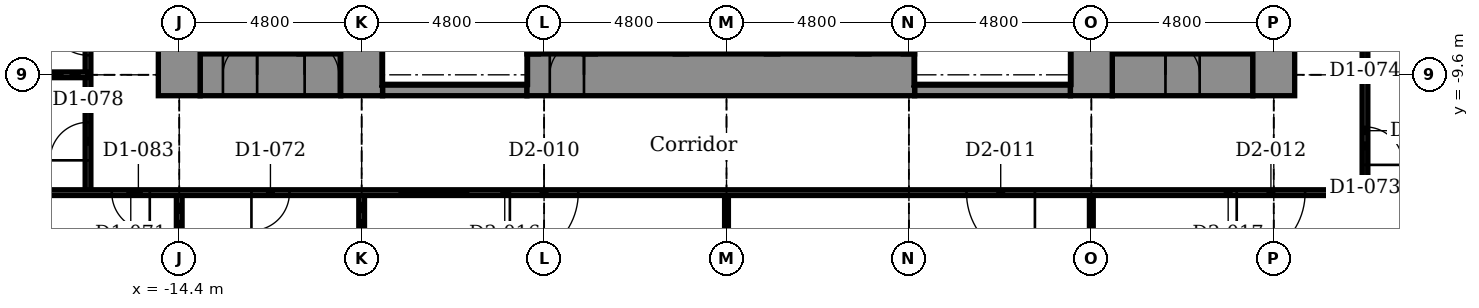
"""IFC4 building model, lengths in metres.
Left out: names, types, materials, properties, quantities, classifications, styles, units other than length and angle.
Written with IfcOpenShell. Run it as: python <this file> out.ifc"""

import sys

from ifc_helpers import new_model, si_unit, direction, frame, frame_2d, origin, place, context, subcontext, project, spatial, rectangle, extrude, element, fill, save


model = new_model("IFC4")
c1 = context("Model", 3, precision=1e-05, world=origin(), true_north=direction((0.0, 1.0)))
c2 = subcontext(c1, "Body", "Model", "MODEL_VIEW")
j1 = project(units=[si_unit("LENGTHUNIT", "METRE"), si_unit("PLANEANGLEUNIT", "RADIAN")], contexts=[c1])
p1 = place(None, origin())
s1 = spatial("IfcSite", under=j1, at=p1, CompositionType="ELEMENT")
p2 = place(p1, origin())
s2 = spatial("IfcBuilding", under=s1, at=p2, CompositionType="ELEMENT")
p3 = place(p2, frame((0.0, 0.0, 22.4)))
s3 = spatial("IfcBuildingStorey", under=s2, at=p3, CompositionType="ELEMENT", Elevation=22.4)
p4 = place(p3, frame((-9.05, -10.0, -0.25), z_axis=(0.0, 0.0, 1.0), x_axis=(1.0, 0.0, 0.0)))
e1 = element("IfcWall", 1, at=p4, inside=s3, PredefinedType="STANDARD", context=c2, shape_type="SweptSolid", body=[
    extrude(rectangle(XDim=3.8, YDim=0.3, at=frame_2d((1.9, 0.0))), origin(), (0.0, 0.0, 1.0), 5.5),
])
p5 = place(p3, frame((4.95, -10.0, -0.25), z_axis=(0.0, 0.0, 1.0), x_axis=(1.0, 0.0, 0.0)))
e2 = element("IfcWall", 2, at=p5, inside=s3, PredefinedType="STANDARD", context=c2, shape_type="SweptSolid", body=[
    extrude(rectangle(XDim=4.1, YDim=0.3, at=frame_2d((2.05, 0.0))), origin(), (0.0, 0.0, 1.0), 5.5),
])
p6 = place(p3, frame((-13.85, -9.6, -0.25), z_axis=(0.0, 0.0, 1.0), x_axis=(1.0, 0.0, 0.0)))
e3 = element("IfcWall", 3, at=p6, inside=s3, PredefinedType="SHEAR", context=c2, shape_type="SweptSolid", body=[
    extrude(rectangle(XDim=3.7, YDim=1.1, at=frame_2d((1.85, 0.0))), origin(), (0.0, 0.0, 1.0), 5.5),
])
p7 = place(p6, frame((0.6, 0.0, 0.25)))
e4 = element("IfcOpeningElement", 4, at=p7, cuts=e3, PredefinedType="OPENING", context=c2, shape_type="SweptSolid", body=[
    extrude(rectangle(XDim=0.9, YDim=2.1, at=frame_2d((0.45, 1.05))), frame((0.0, 0.56, 0.0), z_axis=(0.0, -1.0, 0.0), x_axis=(1.0, 0.0, 0.0)), (0.0, 0.0, 1.0), 1.12),
])
p8 = place(p6, frame((2.75, 0.0, 0.25)))
e5 = element("IfcOpeningElement", 5, at=p8, cuts=e3, PredefinedType="OPENING", context=c2, shape_type="SweptSolid", body=[
    extrude(rectangle(XDim=0.9, YDim=2.1, at=frame_2d((0.45, 1.05))), frame((0.0, 0.56, 0.0), z_axis=(0.0, -1.0, 0.0), x_axis=(1.0, 0.0, 0.0)), (0.0, 0.0, 1.0), 1.12),
])
p9 = place(p3, frame((-5.25, -9.6, -0.25), z_axis=(0.0, 0.0, 1.0), x_axis=(1.0, 0.0, 0.0)))
e6 = element("IfcWall", 6, at=p9, inside=s3, PredefinedType="SHEAR", context=c2, shape_type="SweptSolid", body=[
    extrude(rectangle(XDim=10.2, YDim=1.1, at=frame_2d((5.1, 0.0))), origin(), (0.0, 0.0, 1.0), 5.5),
])
p10 = place(p9, frame((0.6, 0.0, 0.25)))
e7 = element("IfcOpeningElement", 7, at=p10, cuts=e6, PredefinedType="OPENING", context=c2, shape_type="SweptSolid", body=[
    extrude(rectangle(XDim=0.9, YDim=2.1, at=frame_2d((0.45, 1.05))), frame((0.0, 0.56, 0.0), z_axis=(0.0, -1.0, 0.0), x_axis=(1.0, 0.0, 0.0)), (0.0, 0.0, 1.0), 1.12),
])
p11 = place(p3, frame((10.15, -9.6, -0.25), z_axis=(0.0, 0.0, 1.0), x_axis=(1.0, 0.0, 0.0)))
e8 = element("IfcWall", 8, at=p11, inside=s3, PredefinedType="SHEAR", context=c2, shape_type="SweptSolid", body=[
    extrude(rectangle(XDim=3.7, YDim=1.1, at=frame_2d((1.85, 0.0))), origin(), (0.0, 0.0, 1.0), 5.5),
])
p12 = place(p11, frame((1.4, 0.0, 0.25)))
e9 = element("IfcOpeningElement", 9, at=p12, cuts=e8, PredefinedType="OPENING", context=c2, shape_type="SweptSolid", body=[
    extrude(rectangle(XDim=0.9, YDim=2.1, at=frame_2d((0.45, 1.05))), frame((0.0, 0.56, 0.0), z_axis=(0.0, -1.0, 0.0), x_axis=(1.0, 0.0, 0.0)), (0.0, 0.0, 1.0), 1.12),
])
p13 = place(p3, frame((-14.4, -10.15, -0.25), z_axis=(0.0, 0.0, 1.0), x_axis=(0.0, 1.0, 0.0)))
e10 = element("IfcWall", 10, at=p13, inside=s3, PredefinedType="SHEAR", context=c2, shape_type="SweptSolid", body=[
    extrude(rectangle(XDim=20.3, YDim=1.1, at=frame_2d((10.15, 0.0))), origin(), (0.0, 0.0, 1.0), 5.5),
])
p14 = place(p13, frame((3.6, 0.0, 0.25)))
e11 = element("IfcOpeningElement", 11, at=p14, cuts=e10, PredefinedType="OPENING", context=c2, shape_type="SweptSolid", body=[
    extrude(rectangle(XDim=1.1, YDim=2.1, at=frame_2d((0.55, 1.05))), frame((0.0, 0.56, 0.0), z_axis=(0.0, -1.0, 0.0), x_axis=(1.0, 0.0, 0.0)), (0.0, 0.0, 1.0), 1.12),
])
p15 = place(p13, frame((6.0, 0.0, 0.25)))
e12 = element("IfcOpeningElement", 12, at=p15, cuts=e10, PredefinedType="OPENING", context=c2, shape_type="SweptSolid", body=[
    extrude(rectangle(XDim=1.1, YDim=2.1, at=frame_2d((0.55, 1.05))), frame((0.0, 0.56, 0.0), z_axis=(0.0, -1.0, 0.0), x_axis=(1.0, 0.0, 0.0)), (0.0, 0.0, 1.0), 1.12),
])
p16 = place(p13, frame((8.4, 0.0, 0.25)))
e13 = element("IfcOpeningElement", 13, at=p16, cuts=e10, PredefinedType="OPENING", context=c2, shape_type="SweptSolid", body=[
    extrude(rectangle(XDim=1.1, YDim=2.1, at=frame_2d((0.55, 1.05))), frame((0.0, 0.56, 0.0), z_axis=(0.0, -1.0, 0.0), x_axis=(1.0, 0.0, 0.0)), (0.0, 0.0, 1.0), 1.12),
])
p17 = place(p13, frame((10.8, 0.0, 0.25)))
e14 = element("IfcOpeningElement", 14, at=p17, cuts=e10, PredefinedType="OPENING", context=c2, shape_type="SweptSolid", body=[
    extrude(rectangle(XDim=1.1, YDim=2.1, at=frame_2d((0.55, 1.05))), frame((0.0, 0.56, 0.0), z_axis=(0.0, -1.0, 0.0), x_axis=(1.0, 0.0, 0.0)), (0.0, 0.0, 1.0), 1.12),
])
p18 = place(p3, frame((-9.6, -10.15, -0.25), z_axis=(0.0, 0.0, 1.0), x_axis=(0.0, 1.0, 0.0)))
e15 = element("IfcWall", 15, at=p18, inside=s3, PredefinedType="SHEAR", context=c2, shape_type="SweptSolid", body=[
    extrude(rectangle(XDim=7.6, YDim=1.1, at=frame_2d((3.8, 0.0))), origin(), (0.0, 0.0, 1.0), 5.5),
])
p19 = place(p3, frame((-5.1, -9.05, -0.25), z_axis=(0.0, 0.0, 1.0), x_axis=(0.0, 1.0, 0.0)))
e16 = element("IfcWall", 16, at=p19, inside=s3, PredefinedType="STANDARD", context=c2, shape_type="SweptSolid", body=[
    extrude(rectangle(XDim=6.8, YDim=0.3, at=frame_2d((3.4, 0.0))), origin(), (0.0, 0.0, 1.0), 5.5),
])
p20 = place(p19, frame((3.6, 0.0, 0.25)))
e17 = element("IfcOpeningElement", 17, at=p20, cuts=e16, PredefinedType="OPENING", context=c2, shape_type="SweptSolid", body=[
    extrude(rectangle(XDim=1.2, YDim=2.1, at=frame_2d((0.6, 1.05))), frame((0.0, 0.16, 0.0), z_axis=(0.0, -1.0, 0.0), x_axis=(1.0, 0.0, 0.0)), (0.0, 0.0, 1.0), 0.32),
])
for number, where, z_axis, x_axis in (
    (18, (-3.6, -9.05, -0.25), (0.0, 0.0, 1.0), (0.0, 1.0, 0.0)),
    (19, (-1.2, -9.05, -0.25), (0.0, 0.0, 1.0), (0.0, 1.0, 0.0)),
    (20, (1.2, -9.05, -0.25), (0.0, 0.0, 1.0), (0.0, 1.0, 0.0)),
    (21, (3.6, -9.05, -0.25), (0.0, 0.0, 1.0), (0.0, 1.0, 0.0)),
):
    element("IfcWall", number, at=place(p3, frame(where, z_axis=z_axis, x_axis=x_axis)), inside=s3, PredefinedType="STANDARD", context=c2, shape_type="SweptSolid", body=[
        extrude(rectangle(XDim=3.2, YDim=0.3, at=frame_2d((1.6, 0.0))), origin(), (0.0, 0.0, 1.0), 5.5),
    ])
p21 = place(p3, frame((4.8, -9.05, -0.25), z_axis=(0.0, 0.0, 1.0), x_axis=(0.0, 1.0, 0.0)))
e22 = element("IfcWall", 22, at=p21, inside=s3, PredefinedType="STANDARD", context=c2, shape_type="SweptSolid", body=[
    extrude(rectangle(XDim=6.8, YDim=0.3, at=frame_2d((3.4, 0.0))), origin(), (0.0, 0.0, 1.0), 5.5),
])
p22 = place(p21, frame((3.6, 0.0, 0.25)))
e23 = element("IfcOpeningElement", 23, at=p22, cuts=e22, PredefinedType="OPENING", context=c2, shape_type="SweptSolid", body=[
    extrude(rectangle(XDim=1.2, YDim=2.1, at=frame_2d((0.6, 1.05))), frame((0.0, 0.16, 0.0), z_axis=(0.0, -1.0, 0.0), x_axis=(1.0, 0.0, 0.0)), (0.0, 0.0, 1.0), 0.32),
])
p23 = place(p3, frame((9.6, -10.15, -0.25), z_axis=(0.0, 0.0, 1.0), x_axis=(0.0, 1.0, 0.0)))
e24 = element("IfcWall", 24, at=p23, inside=s3, PredefinedType="SHEAR", context=c2, shape_type="SweptSolid", body=[
    extrude(rectangle(XDim=20.3, YDim=1.1, at=frame_2d((10.15, 0.0))), origin(), (0.0, 0.0, 1.0), 5.5),
])
p24 = place(p3, frame((14.4, -10.15, -0.25), z_axis=(0.0, 0.0, 1.0), x_axis=(0.0, 1.0, 0.0)))
e25 = element("IfcWall", 25, at=p24, inside=s3, PredefinedType="SHEAR", context=c2, shape_type="SweptSolid", body=[
    extrude(rectangle(XDim=20.3, YDim=1.1, at=frame_2d((10.15, 0.0))), origin(), (0.0, 0.0, 1.0), 5.5),
])
p25 = place(p24, frame((3.6, 0.0, 0.25)))
e26 = element("IfcOpeningElement", 26, at=p25, cuts=e25, PredefinedType="OPENING", context=c2, shape_type="SweptSolid", body=[
    extrude(rectangle(XDim=1.1, YDim=2.1, at=frame_2d((0.55, 1.05))), frame((0.0, 0.56, 0.0), z_axis=(0.0, -1.0, 0.0), x_axis=(1.0, 0.0, 0.0)), (0.0, 0.0, 1.0), 1.12),
])
p26 = place(p24, frame((6.0, 0.0, 0.25)))
e27 = element("IfcOpeningElement", 27, at=p26, cuts=e25, PredefinedType="OPENING", context=c2, shape_type="SweptSolid", body=[
    extrude(rectangle(XDim=1.1, YDim=2.1, at=frame_2d((0.55, 1.05))), frame((0.0, 0.56, 0.0), z_axis=(0.0, -1.0, 0.0), x_axis=(1.0, 0.0, 0.0)), (0.0, 0.0, 1.0), 1.12),
])
p27 = place(p24, frame((8.4, 0.0, 0.25)))
e28 = element("IfcOpeningElement", 28, at=p27, cuts=e25, PredefinedType="OPENING", context=c2, shape_type="SweptSolid", body=[
    extrude(rectangle(XDim=1.1, YDim=2.1, at=frame_2d((0.55, 1.05))), frame((0.0, 0.56, 0.0), z_axis=(0.0, -1.0, 0.0), x_axis=(1.0, 0.0, 0.0)), (0.0, 0.0, 1.0), 1.12),
])
p28 = place(p24, frame((10.8, 0.0, 0.25)))
e29 = element("IfcOpeningElement", 29, at=p28, cuts=e25, PredefinedType="OPENING", context=c2, shape_type="SweptSolid", body=[
    extrude(rectangle(XDim=1.1, YDim=2.1, at=frame_2d((0.55, 1.05))), frame((0.0, 0.56, 0.0), z_axis=(0.0, -1.0, 0.0), x_axis=(1.0, 0.0, 0.0)), (0.0, 0.0, 1.0), 1.12),
])
p29 = place(p3, frame((16.8, -12.7, 0.0), z_axis=(0.0, 0.0, 1.0), x_axis=(0.0, 1.0, 0.0)))
e30 = element("IfcWall", 30, at=p29, inside=s3, PredefinedType="PARTITIONING", context=c2, shape_type="SweptSolid", body=[
    extrude(rectangle(XDim=8.75, YDim=0.15, at=frame_2d((4.375, 0.0))), origin(), (0.0, 0.0, 1.0), 5.25),
])
p30 = place(p29, frame((0.73, 0.0, 0.0)))
e31 = element("IfcOpeningElement", 31, at=p30, cuts=e30, PredefinedType="OPENING", context=c2, shape_type="SweptSolid", body=[
    extrude(rectangle(XDim=1.0, YDim=2.1, at=frame_2d((0.5, 1.05))), frame((0.0, 0.085, 0.0), z_axis=(0.0, -1.0, 0.0), x_axis=(1.0, 0.0, 0.0)), (0.0, 0.0, 1.0), 0.17),
])
p31 = place(p29, frame((3.795, 0.0, 0.0)))
e32 = element("IfcOpeningElement", 32, at=p31, cuts=e30, PredefinedType="OPENING", context=c2, shape_type="SweptSolid", body=[
    extrude(rectangle(XDim=1.0, YDim=2.1, at=frame_2d((0.5, 1.05))), frame((0.0, 0.085, 0.0), z_axis=(0.0, -1.0, 0.0), x_axis=(1.0, 0.0, 0.0)), (0.0, 0.0, 1.0), 0.17),
])
p32 = place(p29, frame((6.475, 0.0, 0.0)))
e33 = element("IfcOpeningElement", 33, at=p32, cuts=e30, PredefinedType="OPENING", context=c2, shape_type="SweptSolid", body=[
    extrude(rectangle(XDim=1.8, YDim=2.1, at=frame_2d((0.9, 1.05))), frame((0.0, 0.085, 0.0), z_axis=(0.0, -1.0, 0.0), x_axis=(1.0, 0.0, 0.0)), (0.0, 0.0, 1.0), 0.17),
])
for number, where, z_axis, x_axis in (
    (34, (9.6, -18.6, 0.0), (0.0, 0.0, 1.0), (0.0, 1.0, 0.0)),
    (35, (0.0, -18.6, 0.0), (0.0, 0.0, 1.0), (0.0, 1.0, 0.0)),
):
    element("IfcWall", number, at=place(p3, frame(where, z_axis=z_axis, x_axis=x_axis)), inside=s3, PredefinedType="PARTITIONING", context=c2, shape_type="SweptSolid", body=[
        extrude(rectangle(XDim=5.9, YDim=0.1, at=frame_2d((2.95, 0.0))), origin(), (0.0, 0.0, 1.0), 4.793),
    ])
p33 = place(p3, frame((-9.6, -18.6, 0.0), z_axis=(0.0, 0.0, 1.0), x_axis=(0.0, 1.0, 0.0)))
e36 = element("IfcWall", 36, at=p33, inside=s3, PredefinedType="PARTITIONING", context=c2, shape_type="SweptSolid", body=[
    extrude(rectangle(XDim=5.9, YDim=0.15, at=frame_2d((2.95, 0.0))), origin(), (0.0, 0.0, 1.0), 4.793),
])
p34 = place(p3, frame((-11.2, -9.05, 0.0), z_axis=(0.0, 0.0, 1.0), x_axis=(0.0, 1.0, 0.0)))
e37 = element("IfcWall", 37, at=p34, inside=s3, PredefinedType="PARTITIONING", context=c2, shape_type="SweptSolid", body=[
    extrude(rectangle(XDim=1.7, YDim=0.1, at=frame_2d((0.85, 0.0))), origin(), (0.0, 0.0, 1.0), 5.25),
])
p35 = place(p3, frame((-14.4, -19.113, 0.0), z_axis=(0.0, 0.0, 1.0), x_axis=(0.0, 1.0, 0.0)))
e38 = element("IfcWall", 38, at=p35, inside=s3, PredefinedType="PARTITIONING", context=c2, shape_type="SweptSolid", body=[
    extrude(rectangle(XDim=6.413, YDim=0.15, at=frame_2d((3.207, 0.0))), origin(), (0.0, 0.0, 1.0), 4.793),
])
p36 = place(p3, frame((-16.8, -12.7, 0.0), z_axis=(0.0, 0.0, 1.0), x_axis=(0.0, 1.0, 0.0)))
e39 = element("IfcWall", 39, at=p36, inside=s3, PredefinedType="PARTITIONING", context=c2, shape_type="SweptSolid", body=[
    extrude(rectangle(XDim=8.75, YDim=0.15, at=frame_2d((4.375, 0.0))), origin(), (0.0, 0.0, 1.0), 5.25),
])
p37 = place(p36, frame((0.85, 0.0, 0.0)))
e40 = element("IfcOpeningElement", 40, at=p37, cuts=e39, PredefinedType="OPENING", context=c2, shape_type="SweptSolid", body=[
    extrude(rectangle(XDim=1.0, YDim=2.1, at=frame_2d((0.5, 1.05))), frame((0.0, 0.085, 0.0), z_axis=(0.0, -1.0, 0.0), x_axis=(1.0, 0.0, 0.0)), (0.0, 0.0, 1.0), 0.17),
])
p38 = place(p36, frame((3.615, 0.0, 0.0)))
e41 = element("IfcOpeningElement", 41, at=p38, cuts=e39, PredefinedType="OPENING", context=c2, shape_type="SweptSolid", body=[
    extrude(rectangle(XDim=1.0, YDim=2.1, at=frame_2d((0.5, 1.05))), frame((0.0, 0.085, 0.0), z_axis=(0.0, -1.0, 0.0), x_axis=(1.0, 0.0, 0.0)), (0.0, 0.0, 1.0), 0.17),
])
p39 = place(p36, frame((6.485, 0.0, 0.0)))
e42 = element("IfcOpeningElement", 42, at=p39, cuts=e39, PredefinedType="OPENING", context=c2, shape_type="SweptSolid", body=[
    extrude(rectangle(XDim=1.8, YDim=2.1, at=frame_2d((0.9, 1.05))), frame((0.0, 0.085, 0.0), z_axis=(0.0, -1.0, 0.0), x_axis=(1.0, 0.0, 0.0)), (0.0, 0.0, 1.0), 0.17),
])
p40 = place(p3, frame((16.8, -12.7, 0.0), z_axis=(0.0, 0.0, 1.0), x_axis=(1.0, 0.0, 0.0)))
e43 = element("IfcWall", 43, at=p40, inside=s3, PredefinedType="PARTITIONING", context=c2, shape_type="SweptSolid", body=[
    extrude(rectangle(XDim=4.8, YDim=0.1, at=frame_2d((2.4, 0.0))), origin(), (0.0, 0.0, 1.0), 5.25),
])
p41 = place(p3, frame((-21.6, -12.7, 0.0), z_axis=(0.0, 0.0, 1.0), x_axis=(1.0, 0.0, 0.0)))
e44 = element("IfcWall", 44, at=p41, inside=s3, PredefinedType="PARTITIONING", context=c2, shape_type="SweptSolid", body=[
    extrude(rectangle(XDim=38.4, YDim=0.15, at=frame_2d((19.2, 0.0))), origin(), (0.0, 0.0, 1.0), 5.25),
])
p42 = place(p41, frame((5.425, 0.0, 0.0)))
e45 = element("IfcOpeningElement", 45, at=p42, cuts=e44, PredefinedType="OPENING", context=c2, shape_type="SweptSolid", body=[
    extrude(rectangle(XDim=1.0, YDim=2.1, at=frame_2d((0.5, 1.05))), frame((0.0, 0.085, 0.0), z_axis=(0.0, -1.0, 0.0), x_axis=(1.0, 0.0, 0.0)), (0.0, 0.0, 1.0), 0.17),
])
p43 = place(p41, frame((9.1, 0.0, 0.0)))
e46 = element("IfcOpeningElement", 46, at=p43, cuts=e44, PredefinedType="OPENING", context=c2, shape_type="SweptSolid", body=[
    extrude(rectangle(XDim=1.0, YDim=2.1, at=frame_2d((0.5, 1.05))), frame((0.0, 0.085, 0.0), z_axis=(0.0, -1.0, 0.0), x_axis=(1.0, 0.0, 0.0)), (0.0, 0.0, 1.0), 0.17),
])
p44 = place(p41, frame((15.9, 0.0, 0.0)))
e47 = element("IfcOpeningElement", 47, at=p44, cuts=e44, PredefinedType="OPENING", context=c2, shape_type="SweptSolid", body=[
    extrude(rectangle(XDim=1.8, YDim=2.1, at=frame_2d((0.9, 1.05))), frame((0.0, 0.085, 0.0), z_axis=(0.0, -1.0, 0.0), x_axis=(1.0, 0.0, 0.0)), (0.0, 0.0, 1.0), 0.17),
])
p45 = place(p41, frame((27.915, 0.0, 0.0)))
e48 = element("IfcOpeningElement", 48, at=p45, cuts=e44, PredefinedType="OPENING", context=c2, shape_type="SweptSolid", body=[
    extrude(rectangle(XDim=1.8, YDim=2.1, at=frame_2d((0.9, 1.05))), frame((0.0, 0.085, 0.0), z_axis=(0.0, -1.0, 0.0), x_axis=(1.0, 0.0, 0.0)), (0.0, 0.0, 1.0), 0.17),
])
p46 = place(p41, frame((35.025, 0.0, 0.0)))
e49 = element("IfcOpeningElement", 49, at=p46, cuts=e44, PredefinedType="OPENING", context=c2, shape_type="SweptSolid", body=[
    extrude(rectangle(XDim=1.8, YDim=2.1, at=frame_2d((0.9, 1.05))), frame((0.0, 0.085, 0.0), z_axis=(0.0, -1.0, 0.0), x_axis=(1.0, 0.0, 0.0)), (0.0, 0.0, 1.0), 0.17),
])
p47 = place(p41, frame((13.0, 0.0, 0.9)))
e50 = element("IfcOpeningElement", 50, at=p47, cuts=e44, PredefinedType="OPENING", context=c2, shape_type="SweptSolid", body=[
    extrude(rectangle(XDim=1.8, YDim=1.5, at=frame_2d((0.9, 0.75))), frame((0.0, 0.085, 0.0), z_axis=(0.0, -1.0, 0.0), x_axis=(1.0, 0.0, 0.0)), (0.0, 0.0, 1.0), 0.17),
])
p48 = place(p3, frame((16.8, -9.6, 0.0), z_axis=(0.0, 0.0, 1.0), x_axis=(1.0, 0.0, 0.0)))
e51 = element("IfcWall", 51, at=p48, inside=s3, PredefinedType="PARTITIONING", context=c2, shape_type="SweptSolid", body=[
    extrude(rectangle(XDim=1.8, YDim=0.1, at=frame_2d((0.9, 0.0))), origin(), (0.0, 0.0, 1.0), 4.642),
])
p49 = place(p3, frame((-18.6, -9.6, 0.0), z_axis=(0.0, 0.0, 1.0), x_axis=(1.0, 0.0, 0.0)))
e52 = element("IfcWall", 52, at=p49, inside=s3, PredefinedType="PARTITIONING", context=c2, shape_type="SweptSolid", body=[
    extrude(rectangle(XDim=1.8, YDim=0.15, at=frame_2d((0.9, 0.0))), origin(), (0.0, 0.0, 1.0), 4.642),
])
p50 = place(p42, frame((1.0, 0.0, 0.0), z_axis=(0.0, 0.0, 1.0), x_axis=(-1.0, 0.0, 0.0)))
e53 = element("IfcDoor", 53, at=p50, inside=s3, OperationType="SINGLE_SWING_RIGHT", PredefinedType="DOOR", context=c2, shape_type="SweptSolid", body=[
    extrude(rectangle(XDim=1.0, YDim=2.1, at=frame_2d((0.5, 1.05))), frame((0.0, 0.025, 0.0), z_axis=(0.0, -1.0, 0.0), x_axis=(1.0, 0.0, 0.0)), (0.0, 0.0, 1.0), 0.05),
])
fill(e45, e53)
p51 = place(p43, frame((1.0, 0.0, 0.0), z_axis=(0.0, 0.0, 1.0), x_axis=(-1.0, 0.0, 0.0)))
e54 = element("IfcDoor", 54, at=p51, inside=s3, OperationType="SINGLE_SWING_LEFT", PredefinedType="DOOR", context=c2, shape_type="SweptSolid", body=[
    extrude(rectangle(XDim=1.0, YDim=2.1, at=frame_2d((0.5, 1.05))), frame((0.0, 0.025, 0.0), z_axis=(0.0, -1.0, 0.0), x_axis=(1.0, 0.0, 0.0)), (0.0, 0.0, 1.0), 0.05),
])
fill(e46, e54)
p52 = place(p44, frame((1.8, 0.0, 0.0), z_axis=(0.0, 0.0, 1.0), x_axis=(-1.0, 0.0, 0.0)))
e55 = element("IfcDoor", 55, at=p52, inside=s3, OperationType="SINGLE_SWING_LEFT", PredefinedType="DOOR", context=c2, shape_type="SweptSolid", body=[
    extrude(rectangle(XDim=1.8, YDim=2.1, at=frame_2d((0.9, 1.05))), frame((0.0, 0.025, 0.0), z_axis=(0.0, -1.0, 0.0), x_axis=(1.0, 0.0, 0.0)), (0.0, 0.0, 1.0), 0.05),
])
fill(e47, e55)
p53 = place(p45, frame((1.8, 0.0, 0.0), z_axis=(0.0, 0.0, 1.0), x_axis=(-1.0, 0.0, 0.0)))
e56 = element("IfcDoor", 56, at=p53, inside=s3, OperationType="SINGLE_SWING_RIGHT", PredefinedType="DOOR", context=c2, shape_type="SweptSolid", body=[
    extrude(rectangle(XDim=1.8, YDim=2.1, at=frame_2d((0.9, 1.05))), frame((0.0, 0.025, 0.0), z_axis=(0.0, -1.0, 0.0), x_axis=(1.0, 0.0, 0.0)), (0.0, 0.0, 1.0), 0.05),
])
fill(e48, e56)
p54 = place(p46, frame((1.8, 0.0, 0.0), z_axis=(0.0, 0.0, 1.0), x_axis=(-1.0, 0.0, 0.0)))
e57 = element("IfcDoor", 57, at=p54, inside=s3, OperationType="SINGLE_SWING_LEFT", PredefinedType="DOOR", context=c2, shape_type="SweptSolid", body=[
    extrude(rectangle(XDim=1.8, YDim=2.1, at=frame_2d((0.9, 1.05))), frame((0.0, 0.025, 0.0), z_axis=(0.0, -1.0, 0.0), x_axis=(1.0, 0.0, 0.0)), (0.0, 0.0, 1.0), 0.05),
])
fill(e49, e57)
p55 = place(p30, frame((1.0, 0.0, 0.0), z_axis=(0.0, 0.0, 1.0), x_axis=(-1.0, 0.0, 0.0)))
e58 = element("IfcDoor", 58, at=p55, inside=s3, OperationType="SINGLE_SWING_LEFT", PredefinedType="DOOR", context=c2, shape_type="SweptSolid", body=[
    extrude(rectangle(XDim=1.0, YDim=2.1, at=frame_2d((0.5, 1.05))), frame((0.0, 0.025, 0.0), z_axis=(0.0, -1.0, 0.0), x_axis=(1.0, 0.0, 0.0)), (0.0, 0.0, 1.0), 0.05),
])
fill(e31, e58)
p56 = place(p37, origin())
e59 = element("IfcDoor", 59, at=p56, inside=s3, OperationType="SINGLE_SWING_LEFT", PredefinedType="DOOR", context=c2, shape_type="SweptSolid", body=[
    extrude(rectangle(XDim=1.0, YDim=2.1, at=frame_2d((0.5, 1.05))), frame((0.0, 0.025, 0.0), z_axis=(0.0, -1.0, 0.0), x_axis=(1.0, 0.0, 0.0)), (0.0, 0.0, 1.0), 0.05),
])
fill(e40, e59)
p57 = place(p38, origin())
e60 = element("IfcDoor", 60, at=p57, inside=s3, OperationType="SINGLE_SWING_RIGHT", PredefinedType="DOOR", context=c2, shape_type="SweptSolid", body=[
    extrude(rectangle(XDim=1.0, YDim=2.1, at=frame_2d((0.5, 1.05))), frame((0.0, 0.025, 0.0), z_axis=(0.0, -1.0, 0.0), x_axis=(1.0, 0.0, 0.0)), (0.0, 0.0, 1.0), 0.05),
])
fill(e41, e60)
p58 = place(p12, origin())
e61 = element("IfcDoor", 61, at=p58, inside=s3, OperationType="SINGLE_SWING_LEFT", PredefinedType="DOOR", context=c2, shape_type="SweptSolid", body=[
    extrude(rectangle(XDim=0.9, YDim=2.1, at=frame_2d((0.45, 1.05))), frame((0.0, 0.025, 0.0), z_axis=(0.0, -1.0, 0.0), x_axis=(1.0, 0.0, 0.0)), (0.0, 0.0, 1.0), 0.05),
])
fill(e9, e61)
p59 = place(p7, origin())
e62 = element("IfcDoor", 62, at=p59, inside=s3, OperationType="SINGLE_SWING_RIGHT", PredefinedType="DOOR", context=c2, shape_type="SweptSolid", body=[
    extrude(rectangle(XDim=0.9, YDim=2.1, at=frame_2d((0.45, 1.05))), frame((0.0, 0.025, 0.0), z_axis=(0.0, -1.0, 0.0), x_axis=(1.0, 0.0, 0.0)), (0.0, 0.0, 1.0), 0.05),
])
fill(e4, e62)
p60 = place(p8, origin())
e63 = element("IfcDoor", 63, at=p60, inside=s3, OperationType="SINGLE_SWING_LEFT", PredefinedType="DOOR", context=c2, shape_type="SweptSolid", body=[
    extrude(rectangle(XDim=0.9, YDim=2.1, at=frame_2d((0.45, 1.05))), frame((0.0, 0.025, 0.0), z_axis=(0.0, -1.0, 0.0), x_axis=(1.0, 0.0, 0.0)), (0.0, 0.0, 1.0), 0.05),
])
fill(e5, e63)
p61 = place(p10, origin())
e64 = element("IfcDoor", 64, at=p61, inside=s3, OperationType="SINGLE_SWING_RIGHT", PredefinedType="DOOR", context=c2, shape_type="SweptSolid", body=[
    extrude(rectangle(XDim=0.9, YDim=2.1, at=frame_2d((0.45, 1.05))), frame((0.0, 0.025, 0.0), z_axis=(0.0, -1.0, 0.0), x_axis=(1.0, 0.0, 0.0)), (0.0, 0.0, 1.0), 0.05),
])
fill(e7, e64)
p62 = place(p47, origin())
e65 = element("IfcWindow", 65, at=p62, inside=s3, PartitioningType="SINGLE_PANEL", PredefinedType="WINDOW", context=c2, shape_type="SweptSolid", body=[
    extrude(rectangle(XDim=1.8, YDim=1.5, at=frame_2d((0.9, 0.75))), frame((0.0, 0.03, 0.0), z_axis=(0.0, -1.0, 0.0), x_axis=(1.0, 0.0, 0.0)), (0.0, 0.0, 1.0), 0.06),
])
fill(e50, e65)
save(model, sys.argv[1])
